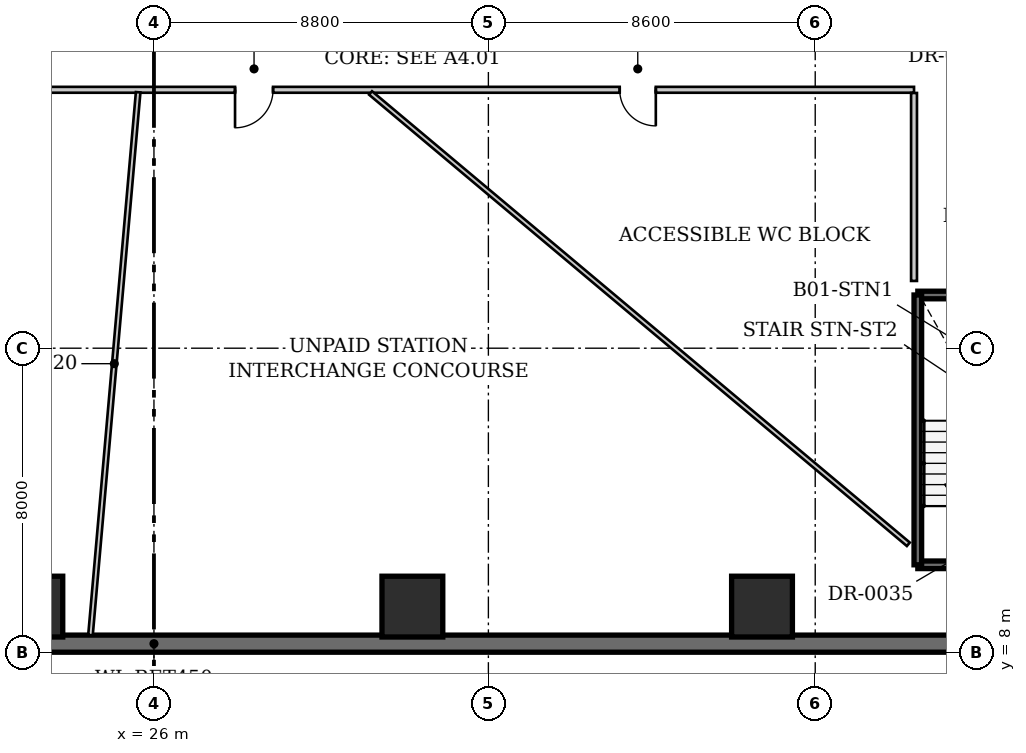
"""IFC4 building model, lengths in metres.
Left out: names, types, materials, properties, quantities, classifications, styles, units other than length and angle.
Written with IfcOpenShell. Run it as: python <this file> out.ifc"""

import sys

from ifc_helpers import new_model, si_unit, direction, frame, frame_2d, origin, origin_2d, place, context, subcontext, project, spatial, rectangle, extrude, source, transform, mapped, element, fill, save


model = new_model("IFC4")
c1 = context("Model", 3, precision=1e-05, world=origin(), true_north=direction((0.0, 1.0)))
c2 = subcontext(c1, "Body", "Model", "MODEL_VIEW")
j1 = project(units=[si_unit("LENGTHUNIT", "METRE"), si_unit("PLANEANGLEUNIT", "RADIAN")], contexts=[c1])
p1 = place(None, origin())
s1 = spatial("IfcSite", under=j1, at=p1, CompositionType="ELEMENT")
p2 = place(p1, origin())
s2 = spatial("IfcBuilding", under=s1, at=p2, CompositionType="ELEMENT")
p3 = place(p2, frame((0.0, 0.0, -5.8)))
s3 = spatial("IfcBuildingStorey", under=s2, at=p3, CompositionType="ELEMENT", Elevation=-5.8)
for number, where, z_axis, x_axis in (
    (1, (22.8, 9.2, 0.0), (0.0, 0.0, 1.0), (1.0, 0.0, 0.0)),
    (2, (32.8, 9.2, 0.0), (0.0, 0.0, 1.0), (1.0, 0.0, 0.0)),
    (3, (42.0, 9.2, 0.0), (0.0, 0.0, 1.0), (1.0, 0.0, 0.0)),
):
    element("IfcColumn", number, at=place(p3, frame(where, z_axis=z_axis, x_axis=x_axis)), inside=s3, PredefinedType="COLUMN", context=c2, shape_type="SweptSolid", body=[
        extrude(rectangle(XDim=1.6, YDim=1.6, at=origin_2d()), origin(), (0.0, 0.0, 1.0), 5.45),
    ])
p4 = place(p3, frame((51.775, 8.225, 0.0), z_axis=(0.0, 0.0, 1.0), x_axis=(-1.0, 0.0, 0.0)))
e4 = element("IfcWall", 4, at=p4, inside=s3, PredefinedType="SHEAR", context=c2, shape_type="SweptSolid", body=[
    extrude(rectangle(XDim=51.55, YDim=0.45, at=frame_2d((25.775, 0.0))), origin(), (0.0, 0.0, 1.0), 5.8),
])
p5 = place(p3, frame((49.36, 10.3, 0.0), z_axis=(0.0, 0.0, 1.0), x_axis=(-1.0, 0.0, 0.0)))
e5 = element("IfcWall", 5, at=p5, inside=s3, PredefinedType="SHEAR", context=c2, shape_type="SweptSolid", body=[
    extrude(rectangle(XDim=3.26, YDim=0.2, at=frame_2d((1.63, 0.0))), origin(), (0.0, 0.0, 1.0), 5.8),
])
p6 = place(p5, frame((1.1, 0.0, 0.0)))
e6 = element("IfcOpeningElement", 6, at=p6, cuts=e5, PredefinedType="OPENING", context=c2, shape_type="SweptSolid", body=[
    extrude(rectangle(XDim=1.05, YDim=2.15, at=frame_2d((0.525, 1.075))), frame((0.0, 0.11, 0.0), z_axis=(0.0, -1.0, 0.0), x_axis=(1.0, 0.0, 0.0)), (0.0, 0.0, 1.0), 0.22),
])
p7 = place(p3, frame((46.1, 17.4, 0.0), z_axis=(0.0, 0.0, 1.0), x_axis=(1.0, 0.0, 0.0)))
e7 = element("IfcWall", 7, at=p7, inside=s3, PredefinedType="SHEAR", context=c2, shape_type="SweptSolid", body=[
    extrude(rectangle(XDim=3.26, YDim=0.2, at=frame_2d((1.63, 0.0))), origin(), (0.0, 0.0, 1.0), 5.8),
])
p8 = place(p3, frame((46.1, 10.3, 0.0), z_axis=(0.0, 0.0, 1.0), x_axis=(0.0, 1.0, 0.0)))
e8 = element("IfcWall", 8, at=p8, inside=s3, PredefinedType="SHEAR", context=c2, shape_type="SweptSolid", body=[
    extrude(rectangle(XDim=7.1, YDim=0.2, at=frame_2d((3.55, 0.0))), origin(), (0.0, 0.0, 1.0), 5.8),
])
p9 = place(p3, frame((46.0, 22.8, 0.0), z_axis=(0.0, 0.0, 1.0), x_axis=(-1.0, 0.0, 0.0)))
e9 = element("IfcWall", 9, at=p9, inside=s3, PredefinedType="PARTITIONING", context=c2, shape_type="SweptSolid", body=[
    extrude(rectangle(XDim=43.8, YDim=0.155, at=frame_2d((21.9, 0.0))), origin(), (0.0, 0.0, 1.0), 5.45),
])
p10 = place(p9, frame((33.418, 0.0, 0.0)))
e10 = element("IfcOpeningElement", 10, at=p10, cuts=e9, PredefinedType="OPENING", context=c2, shape_type="SweptSolid", body=[
    extrude(rectangle(XDim=1.0, YDim=2.15, at=frame_2d((0.5, 1.075))), frame((0.0, 0.087, 0.0), z_axis=(0.0, -1.0, 0.0), x_axis=(1.0, 0.0, 0.0)), (0.0, 0.0, 1.0), 0.175),
])
p11 = place(p9, frame((16.866, 0.0, 0.0)))
e11 = element("IfcOpeningElement", 11, at=p11, cuts=e9, PredefinedType="OPENING", context=c2, shape_type="SweptSolid", body=[
    extrude(rectangle(XDim=1.0, YDim=2.15, at=frame_2d((0.5, 1.075))), frame((0.0, 0.087, 0.0), z_axis=(0.0, -1.0, 0.0), x_axis=(1.0, 0.0, 0.0)), (0.0, 0.0, 1.0), 0.175),
])
p12 = place(p9, frame((6.794, 0.0, 0.0)))
e12 = element("IfcOpeningElement", 12, at=p12, cuts=e9, PredefinedType="OPENING", context=c2, shape_type="SweptSolid", body=[
    extrude(rectangle(XDim=0.95, YDim=2.15, at=frame_2d((0.475, 1.075))), frame((0.0, 0.087, 0.0), z_axis=(0.0, -1.0, 0.0), x_axis=(1.0, 0.0, 0.0)), (0.0, 0.0, 1.0), 0.175),
])
p13 = place(p3, frame((46.0, 17.77, 0.0), z_axis=(0.0, 0.0, 1.0), x_axis=(0.0, 1.0, 0.0)))
e13 = element("IfcWall", 13, at=p13, inside=s3, PredefinedType="PARTITIONING", context=c2, shape_type="SweptSolid", body=[
    extrude(rectangle(XDim=4.947, YDim=0.155, at=frame_2d((2.473, 0.0))), origin(), (0.0, 0.0, 1.0), 5.45),
])
p14 = place(p3, frame((25.584, 22.735, 0.0), z_axis=(0.0, 0.0, 1.0), x_axis=(-0.087457552049, -0.99616824713, 0.0)))
e14 = element("IfcWall", 14, at=p14, inside=s3, PredefinedType="PARTITIONING", context=c2, shape_type="SweptSolid", body=[
    extrude(rectangle(XDim=14.34, YDim=0.12, at=frame_2d((7.17, 0.0))), origin(), (0.0, 0.0, 1.0), 5.45),
])
p15 = place(p3, frame((31.699, 22.717, 0.0), z_axis=(0.0, 0.0, 1.0), x_axis=(0.765973207977, -0.642872494871, 0.0)))
e15 = element("IfcWall", 15, at=p15, inside=s3, PredefinedType="PARTITIONING", context=c2, shape_type="SweptSolid", body=[
    extrude(rectangle(XDim=18.474, YDim=0.12, at=frame_2d((9.237, 0.0))), origin(), (0.0, 0.0, 1.0), 5.45),
])
m1 = source(origin(), c2, "Body", "SweptSolid", [
    extrude(rectangle(XDim=1.0, YDim=2.15, at=frame_2d((0.5, 1.075))), frame((0.0, 0.025, 0.0), z_axis=(0.0, -1.0, 0.0), x_axis=(1.0, 0.0, 0.0)), (0.0, 0.0, 1.0), 0.05),
])
p16 = place(p11, origin())
e16 = element("IfcDoor", 16, at=p16, inside=s3, OperationType="SINGLE_SWING_RIGHT", PredefinedType="DOOR", context=c2, shape_type="MappedRepresentation", body=[
    mapped(m1, transform((0.0, 0.0, 0.0), x_axis=(1.0, 0.0, 0.0), y_axis=(0.0, 1.0, 0.0), z_axis=(0.0, 0.0, 1.0), scale=1.0)),
])
fill(e11, e16)
m2 = source(origin(), c2, "Body", "SweptSolid", [
    extrude(rectangle(XDim=0.95, YDim=2.15, at=frame_2d((0.475, 1.075))), frame((0.0, 0.025, 0.0), z_axis=(0.0, -1.0, 0.0), x_axis=(1.0, 0.0, 0.0)), (0.0, 0.0, 1.0), 0.05),
])
p17 = place(p12, origin())
e17 = element("IfcDoor", 17, at=p17, inside=s3, OperationType="SINGLE_SWING_LEFT", PredefinedType="DOOR", context=c2, shape_type="MappedRepresentation", body=[
    mapped(m2, transform((0.0, 0.0, 0.0), x_axis=(1.0, 0.0, 0.0), y_axis=(0.0, 1.0, 0.0), z_axis=(0.0, 0.0, 1.0), scale=1.0)),
])
fill(e12, e17)
save(model, sys.argv[1])
